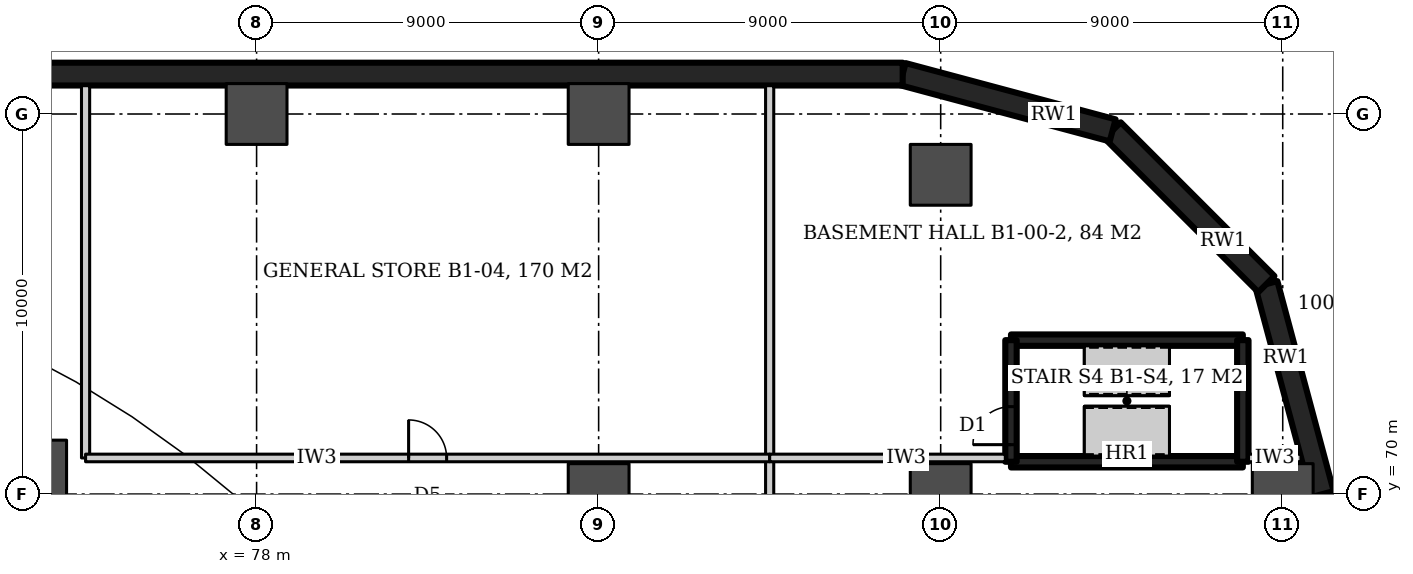
"""IFC4 building model, lengths in metres.
Left out: names, types, materials, properties, quantities, classifications, styles, units other than length and angle.
Written with IfcOpenShell. Run it as: python <this file> out.ifc"""

import sys

from ifc_helpers import new_model, si_unit, direction, frame, frame_2d, origin, origin_2d, place, context, subcontext, project, spatial, rectangle, circle, extrude, element, fill, save


model = new_model("IFC4")
c1 = context("Model", 3, precision=1e-05, world=origin(), true_north=direction((0.0, 1.0)))
c2 = subcontext(c1, "Body", "Model", "MODEL_VIEW")
j1 = project(units=[si_unit("LENGTHUNIT", "METRE"), si_unit("PLANEANGLEUNIT", "RADIAN")], contexts=[c1])
p1 = place(None, origin())
s1 = spatial("IfcSite", under=j1, at=p1, CompositionType="ELEMENT")
p2 = place(p1, origin())
s2 = spatial("IfcBuilding", under=s1, at=p2, CompositionType="ELEMENT")
p3 = place(p2, frame((0.0, 0.0, -6.0)))
s3 = spatial("IfcBuildingStorey", under=s2, at=p3, CompositionType="ELEMENT", Elevation=-6.0)
p4 = place(p3, frame((106.05, 70.0, -0.5), z_axis=(0.0, 0.0, 1.0), x_axis=(-0.258831381584, 0.965922520654, 0.0)))
e1 = element("IfcWall", 1, at=p4, inside=s3, PredefinedType="SOLIDWALL", context=c2, shape_type="SweptSolid", body=[
    extrude(rectangle(XDim=5.72, YDim=0.6, at=frame_2d((2.86, 0.0))), origin(), (0.0, 0.0, 1.0), 6.2),
])
p5 = place(p3, frame((104.57, 75.525, -0.5), z_axis=(0.0, 0.0, 1.0), x_axis=(-0.707106781187, 0.707106781187, 0.0)))
e2 = element("IfcWall", 2, at=p5, inside=s3, PredefinedType="SOLIDWALL", context=c2, shape_type="SweptSolid", body=[
    extrude(rectangle(XDim=5.72, YDim=0.6, at=frame_2d((2.86, 0.0))), origin(), (0.0, 0.0, 1.0), 6.2),
])
p6 = place(p3, frame((100.525, 79.57, -0.5), z_axis=(0.0, 0.0, 1.0), x_axis=(-0.965922520654, 0.258831381584, 0.0)))
e3 = element("IfcWall", 3, at=p6, inside=s3, PredefinedType="SOLIDWALL", context=c2, shape_type="SweptSolid", body=[
    extrude(rectangle(XDim=5.72, YDim=0.6, at=frame_2d((2.86, 0.0))), origin(), (0.0, 0.0, 1.0), 6.2),
])
p7 = place(p3, frame((95.0, 81.05, -0.5), z_axis=(0.0, 0.0, 1.0), x_axis=(-1.0, 0.0, 0.0)))
e4 = element("IfcWall", 4, at=p7, inside=s3, PredefinedType="SOLIDWALL", context=c2, shape_type="SweptSolid", body=[
    extrude(rectangle(XDim=70.0, YDim=0.6, at=frame_2d((35.0, 0.0))), origin(), (0.0, 0.0, 1.0), 6.2),
])
for number, where, z_axis, x_axis in (
    (5, (87.0, 70.0, -0.5), (0.0, 0.0, 1.0), (1.0, 0.0, 0.0)),
    (6, (96.0, 70.0, -0.5), (0.0, 0.0, 1.0), (1.0, 0.0, 0.0)),
    (7, (105.0, 70.0, -0.5), (0.0, 0.0, 1.0), (1.0, 0.0, 0.0)),
    (8, (96.0, 78.4, -0.5), (0.0, 0.0, 1.0), (1.0, 0.0, 0.0)),
    (9, (78.0, 80.0, -0.5), (0.0, 0.0, 1.0), (1.0, 0.0, 0.0)),
    (10, (87.0, 80.0, -0.5), (0.0, 0.0, 1.0), (1.0, 0.0, 0.0)),
):
    element("IfcColumn", number, at=place(p3, frame(where, z_axis=z_axis, x_axis=x_axis)), inside=s3, PredefinedType="COLUMN", context=c2, shape_type="SweptSolid", body=[
        extrude(rectangle(XDim=1.6, YDim=1.6, at=origin_2d()), origin(), (0.0, 0.0, 1.0), 6.5),
    ])
p8 = place(p3, frame((71.5, 69.919, 0.0), z_axis=(0.0, 0.0, 1.0), x_axis=(1.0, 0.0, 0.0)))
e11 = element("IfcColumn", 11, at=p8, inside=s3, PredefinedType="COLUMN", context=c2, shape_type="SweptSolid", body=[
    extrude(circle(Radius=1.5, at=origin_2d()), origin(), (0.0, 0.0, 1.0), 6.0),
])
p9 = place(p3, frame((73.5, 70.95, 0.0), z_axis=(0.0, 0.0, 1.0), x_axis=(0.0, 1.0, 0.0)))
e12 = element("IfcWall", 12, at=p9, inside=s3, PredefinedType="PARTITIONING", context=c2, shape_type="SweptSolid", body=[
    extrude(rectangle(XDim=9.795, YDim=0.215, at=frame_2d((4.897, 0.0))), origin(), (0.0, 0.0, 1.0), 3.68),
])
p10 = place(p3, frame((91.5, 31.0, 0.0), z_axis=(0.0, 0.0, 1.0), x_axis=(0.0, 1.0, 0.0)))
e13 = element("IfcWall", 13, at=p10, inside=s3, PredefinedType="PARTITIONING", context=c2, shape_type="SweptSolid", body=[
    extrude(rectangle(XDim=39.95, YDim=0.215, at=frame_2d((19.975, 0.0))), origin(), (0.0, 0.0, 1.0), 3.68),
])
p11 = place(p10, frame((18.975, 0.0, 0.0)))
e14 = element("IfcOpeningElement", 14, at=p11, cuts=e13, PredefinedType="OPENING", context=c2, shape_type="SweptSolid", body=[
    extrude(rectangle(XDim=2.0, YDim=2.4, at=frame_2d((1.0, 1.2))), frame((0.0, 0.117, 0.0), z_axis=(0.0, -1.0, 0.0), x_axis=(1.0, 0.0, 0.0)), (0.0, 0.0, 1.0), 0.235),
])
p12 = place(p3, frame((91.5, 70.95, 0.0), z_axis=(0.0, 0.0, 1.0), x_axis=(0.0, 1.0, 0.0)))
e15 = element("IfcWall", 15, at=p12, inside=s3, PredefinedType="PARTITIONING", context=c2, shape_type="SweptSolid", body=[
    extrude(rectangle(XDim=9.795, YDim=0.215, at=frame_2d((4.897, 0.0))), origin(), (0.0, 0.0, 1.0), 3.68),
])
p13 = place(p3, frame((73.5, 70.95, 0.0), z_axis=(0.0, 0.0, 1.0), x_axis=(1.0, 0.0, 0.0)))
e16 = element("IfcWall", 16, at=p13, inside=s3, PredefinedType="PARTITIONING", context=c2, shape_type="SweptSolid", body=[
    extrude(rectangle(XDim=18.0, YDim=0.2, at=frame_2d((9.0, 0.0))), origin(), (0.0, 0.0, 1.0), 3.68),
])
p14 = place(p13, frame((8.5, 0.0, 0.0)))
e17 = element("IfcOpeningElement", 17, at=p14, cuts=e16, PredefinedType="OPENING", context=c2, shape_type="SweptSolid", body=[
    extrude(rectangle(XDim=1.0, YDim=2.1, at=frame_2d((0.5, 1.05))), frame((0.0, 0.11, 0.0), z_axis=(0.0, -1.0, 0.0), x_axis=(1.0, 0.0, 0.0)), (0.0, 0.0, 1.0), 0.22),
])
p15 = place(p3, frame((91.5, 70.95, 0.0), z_axis=(0.0, 0.0, 1.0), x_axis=(1.0, 0.0, 0.0)))
e18 = element("IfcWall", 18, at=p15, inside=s3, PredefinedType="PARTITIONING", context=c2, shape_type="SweptSolid", body=[
    extrude(rectangle(XDim=6.2, YDim=0.2, at=frame_2d((3.1, 0.0))), origin(), (0.0, 0.0, 1.0), 4.1),
])
p16 = place(p3, frame((104.1, 70.95, 0.0), z_axis=(0.0, 0.0, 1.0), x_axis=(1.0, 0.0, 0.0)))
e19 = element("IfcWall", 19, at=p16, inside=s3, PredefinedType="PARTITIONING", context=c2, shape_type="SweptSolid", body=[
    extrude(rectangle(XDim=1.38, YDim=0.2, at=frame_2d((0.69, 0.0))), origin(), (0.0, 0.0, 1.0), 4.1),
])
for number, where, z_axis, x_axis in (
    (20, (97.85, 70.85, 0.0), (0.0, 0.0, 1.0), (1.0, 0.0, 0.0)),
    (21, (97.85, 74.05, 0.0), (0.0, 0.0, 1.0), (1.0, 0.0, 0.0)),
):
    element("IfcWall", number, at=place(p3, frame(where, z_axis=z_axis, x_axis=x_axis)), inside=s3, PredefinedType="SHEAR", context=c2, shape_type="SweptSolid", body=[
        extrude(rectangle(XDim=6.1, YDim=0.3, at=frame_2d((3.05, 0.0))), origin(), (0.0, 0.0, 1.0), 6.0),
    ])
p17 = place(p3, frame((97.85, 70.85, 0.0), z_axis=(0.0, 0.0, 1.0), x_axis=(0.0, 1.0, 0.0)))
e22 = element("IfcWall", 22, at=p17, inside=s3, PredefinedType="SHEAR", context=c2, shape_type="SweptSolid", body=[
    extrude(rectangle(XDim=3.2, YDim=0.3, at=frame_2d((1.6, 0.0))), origin(), (0.0, 0.0, 1.0), 6.0),
])
p18 = place(p17, frame((0.45, 0.0, 0.0)))
e23 = element("IfcOpeningElement", 23, at=p18, cuts=e22, PredefinedType="OPENING", context=c2, shape_type="SweptSolid", body=[
    extrude(rectangle(XDim=1.0, YDim=2.1, at=frame_2d((0.5, 1.05))), frame((0.0, 0.16, 0.0), z_axis=(0.0, -1.0, 0.0), x_axis=(1.0, 0.0, 0.0)), (0.0, 0.0, 1.0), 0.32),
])
p19 = place(p3, frame((103.95, 70.85, 0.0), z_axis=(0.0, 0.0, 1.0), x_axis=(0.0, 1.0, 0.0)))
e24 = element("IfcWall", 24, at=p19, inside=s3, PredefinedType="SHEAR", context=c2, shape_type="SweptSolid", body=[
    extrude(rectangle(XDim=3.2, YDim=0.3, at=frame_2d((1.6, 0.0))), origin(), (0.0, 0.0, 1.0), 6.0),
])
p20 = place(p14, origin())
e25 = element("IfcDoor", 25, at=p20, inside=s3, OperationType="SINGLE_SWING_LEFT", PredefinedType="DOOR", context=c2, shape_type="SweptSolid", body=[
    extrude(rectangle(XDim=1.0, YDim=2.1, at=frame_2d((0.5, 1.05))), frame((0.0, 0.025, 0.0), z_axis=(0.0, -1.0, 0.0), x_axis=(1.0, 0.0, 0.0)), (0.0, 0.0, 1.0), 0.05),
])
fill(e17, e25)
p21 = place(p18, origin())
e26 = element("IfcDoor", 26, at=p21, inside=s3, OperationType="SINGLE_SWING_LEFT", PredefinedType="DOOR", context=c2, shape_type="SweptSolid", body=[
    extrude(rectangle(XDim=1.0, YDim=2.1, at=frame_2d((0.5, 1.05))), frame((0.0, 0.025, 0.0), z_axis=(0.0, -1.0, 0.0), x_axis=(1.0, 0.0, 0.0)), (0.0, 0.0, 1.0), 0.05),
])
fill(e23, e26)
save(model, sys.argv[1])
